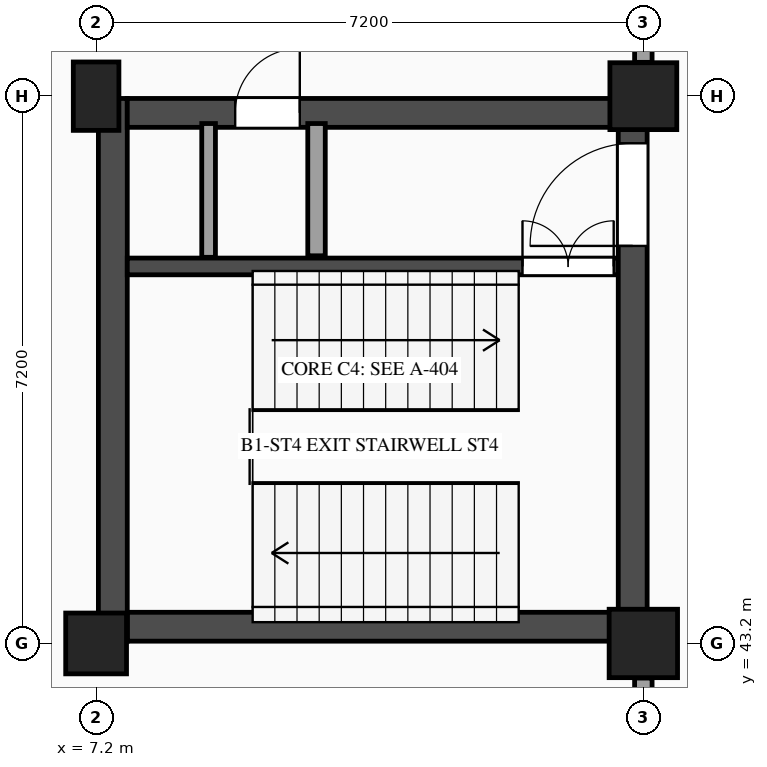
"""IFC4 building model, lengths in metres.
Left out: names, types, materials, properties, quantities, classifications, styles, units other than length and angle.
Written with IfcOpenShell. Run it as: python <this file> out.ifc"""

import sys

from ifc_helpers import new_model, si_unit, direction, frame, frame_2d, origin, origin_2d, place, context, subcontext, project, spatial, rectangle, extrude, element, fill, save


model = new_model("IFC4")
c1 = context("Model", 3, precision=1e-05, world=origin(), true_north=direction((0.0, 1.0)))
c2 = subcontext(c1, "Body", "Model", "MODEL_VIEW")
j1 = project(units=[si_unit("LENGTHUNIT", "METRE"), si_unit("PLANEANGLEUNIT", "RADIAN")], contexts=[c1])
p1 = place(None, origin())
s1 = spatial("IfcSite", under=j1, at=p1, CompositionType="ELEMENT")
p2 = place(p1, origin())
s2 = spatial("IfcBuilding", under=s1, at=p2, CompositionType="ELEMENT")
p3 = place(p2, frame((0.0, 0.0, -4.5)))
s3 = spatial("IfcBuildingStorey", under=s2, at=p3, CompositionType="ELEMENT", Elevation=-4.5)
p4 = place(p3, frame((7.2, 43.2, -0.45), z_axis=(0.0, 0.0, 1.0), x_axis=(1.0, 0.0, 0.0)))
e1 = element("IfcColumn", 1, at=p4, inside=s3, PredefinedType="COLUMN", context=c2, shape_type="SweptSolid", body=[
    extrude(rectangle(XDim=0.8, YDim=0.8, at=origin_2d()), origin(), (0.0, 0.0, 1.0), 4.95),
])
p5 = place(p3, frame((7.2, 50.4, -0.45), z_axis=(0.0, 0.0, 1.0), x_axis=(1.0, 0.0, 0.0)))
e2 = element("IfcColumn", 2, at=p5, inside=s3, PredefinedType="COLUMN", context=c2, shape_type="SweptSolid", body=[
    extrude(rectangle(XDim=0.6, YDim=0.9, at=origin_2d()), origin(), (0.0, 0.0, 1.0), 4.95),
])
p6 = place(p3, frame((14.4, 43.2, -0.45), z_axis=(0.0, 0.0, 1.0), x_axis=(1.0, 0.0, 0.0)))
e3 = element("IfcColumn", 3, at=p6, inside=s3, PredefinedType="COLUMN", context=c2, shape_type="SweptSolid", body=[
    extrude(rectangle(XDim=0.9, YDim=0.9, at=origin_2d()), origin(), (0.0, 0.0, 1.0), 4.95),
])
p7 = place(p3, frame((14.4, 50.4, -0.45), z_axis=(0.0, 0.0, 1.0), x_axis=(1.0, 0.0, 0.0)))
e4 = element("IfcColumn", 4, at=p7, inside=s3, PredefinedType="COLUMN", context=c2, shape_type="SweptSolid", body=[
    extrude(rectangle(XDim=0.88, YDim=0.88, at=origin_2d()), origin(), (0.0, 0.0, 1.0), 4.95),
])
p8 = place(p3, frame((7.61, 43.42, 0.0), z_axis=(0.0, 0.0, 1.0), x_axis=(1.0, 0.0, 0.0)))
e5 = element("IfcWall", 5, at=p8, inside=s3, PredefinedType="SHEAR", context=c2, shape_type="SweptSolid", body=[
    extrude(rectangle(XDim=6.46, YDim=0.38, at=frame_2d((3.23, 0.0))), origin(), (0.0, 0.0, 1.0), 4.17),
])
p9 = place(p3, frame((7.42, 50.37, 0.0), z_axis=(0.0, 0.0, 1.0), x_axis=(0.0, -1.0, 0.0)))
e6 = element("IfcWall", 6, at=p9, inside=s3, PredefinedType="SHEAR", context=c2, shape_type="SweptSolid", body=[
    extrude(rectangle(XDim=7.14, YDim=0.38, at=frame_2d((3.57, 0.0))), origin(), (0.0, 0.0, 1.0), 4.17),
])
p10 = place(p3, frame((7.61, 50.18, 0.0), z_axis=(0.0, 0.0, 1.0), x_axis=(1.0, 0.0, 0.0)))
e7 = element("IfcWall", 7, at=p10, inside=s3, PredefinedType="SHEAR", context=c2, shape_type="SweptSolid", body=[
    extrude(rectangle(XDim=6.46, YDim=0.38, at=frame_2d((3.23, 0.0))), origin(), (0.0, 0.0, 1.0), 4.17),
])
p11 = place(p10, frame((1.42, 0.0, 0.0)))
e8 = element("IfcOpeningElement", 8, at=p11, cuts=e7, PredefinedType="OPENING", context=c2, shape_type="SweptSolid", body=[
    extrude(rectangle(XDim=0.85, YDim=2.1, at=frame_2d((0.425, 1.05))), frame((0.0, 0.2, 0.0), z_axis=(0.0, -1.0, 0.0), x_axis=(1.0, 0.0, 0.0)), (0.0, 0.0, 1.0), 0.4),
])
p12 = place(p3, frame((7.61, 48.16, 0.0), z_axis=(0.0, 0.0, 1.0), x_axis=(1.0, 0.0, 0.0)))
e9 = element("IfcWall", 9, at=p12, inside=s3, PredefinedType="SHEAR", context=c2, shape_type="SweptSolid", body=[
    extrude(rectangle(XDim=6.46, YDim=0.22, at=frame_2d((3.23, 0.0))), origin(), (0.0, 0.0, 1.0), 4.17),
])
p13 = place(p12, frame((5.2, 0.0, 0.0)))
e10 = element("IfcOpeningElement", 10, at=p13, cuts=e9, PredefinedType="OPENING", context=c2, shape_type="SweptSolid", body=[
    extrude(rectangle(XDim=1.2, YDim=2.2, at=frame_2d((0.6, 1.1))), frame((0.0, 0.12, 0.0), z_axis=(0.0, -1.0, 0.0), x_axis=(1.0, 0.0, 0.0)), (0.0, 0.0, 1.0), 0.24),
])
p14 = place(p3, frame((10.1, 48.3, 0.0), z_axis=(0.0, 0.0, 1.0), x_axis=(0.0, 1.0, 0.0)))
e11 = element("IfcWall", 11, at=p14, inside=s3, PredefinedType="PARTITIONING", context=c2, shape_type="SweptSolid", body=[
    extrude(rectangle(XDim=1.74, YDim=0.23, at=frame_2d((0.87, 0.0))), origin(), (0.0, 0.0, 1.0), 4.17),
])
p15 = place(p3, frame((8.68, 48.28, 0.0), z_axis=(0.0, 0.0, 1.0), x_axis=(0.0, 1.0, 0.0)))
e12 = element("IfcWall", 12, at=p15, inside=s3, PredefinedType="PARTITIONING", context=c2, shape_type="SweptSolid", body=[
    extrude(rectangle(XDim=1.76, YDim=0.18, at=frame_2d((0.88, 0.0))), origin(), (0.0, 0.0, 1.0), 4.17),
])
p16 = place(p3, frame((14.26, 43.23, 0.0), z_axis=(0.0, 0.0, 1.0), x_axis=(0.0, 1.0, 0.0)))
e13 = element("IfcWall", 13, at=p16, inside=s3, PredefinedType="SHEAR", context=c2, shape_type="SweptSolid", body=[
    extrude(rectangle(XDim=7.14, YDim=0.38, at=frame_2d((3.57, 0.0))), origin(), (0.0, 0.0, 1.0), 4.17),
])
p17 = place(p16, frame((5.2, 0.0, 0.0)))
e14 = element("IfcOpeningElement", 14, at=p17, cuts=e13, PredefinedType="OPENING", context=c2, shape_type="SweptSolid", body=[
    extrude(rectangle(XDim=1.35, YDim=2.15, at=frame_2d((0.675, 1.075))), frame((0.0, 0.2, 0.0), z_axis=(0.0, -1.0, 0.0), x_axis=(1.0, 0.0, 0.0)), (0.0, 0.0, 1.0), 0.4),
])
p18 = place(p3, frame((14.4, 36.33, 0.0), z_axis=(0.0, 0.0, 1.0), x_axis=(0.0, 1.0, 0.0)))
e15 = element("IfcWall", 15, at=p18, inside=s3, PredefinedType="PARTITIONING", context=c2, shape_type="SweptSolid", body=[
    extrude(rectangle(XDim=6.415, YDim=0.23, at=frame_2d((3.208, 0.0))), origin(), (0.0, 0.0, 1.0), 3.475),
])
p19 = place(p18, frame((2.532, 0.0, 0.0)))
e16 = element("IfcOpeningElement", 16, at=p19, cuts=e15, PredefinedType="OPENING", context=c2, shape_type="SweptSolid", body=[
    extrude(rectangle(XDim=1.35, YDim=2.15, at=frame_2d((0.675, 1.075))), frame((0.0, 0.125, 0.0), z_axis=(0.0, -1.0, 0.0), x_axis=(1.0, 0.0, 0.0)), (0.0, 0.0, 1.0), 0.25),
])
p20 = place(p3, frame((14.4, 50.845, 0.0), z_axis=(0.0, 0.0, 1.0), x_axis=(0.0, 1.0, 0.0)))
e17 = element("IfcWall", 17, at=p20, inside=s3, PredefinedType="PARTITIONING", context=c2, shape_type="SweptSolid", body=[
    extrude(rectangle(XDim=6.34, YDim=0.23, at=frame_2d((3.17, 0.0))), origin(), (0.0, 0.0, 1.0), 3.54),
])
p21 = place(p11, origin())
e18 = element("IfcDoor", 18, at=p21, inside=s3, OperationType="SINGLE_SWING_RIGHT", PredefinedType="DOOR", context=c2, shape_type="SweptSolid", body=[
    extrude(rectangle(XDim=0.85, YDim=2.1, at=frame_2d((0.425, 1.05))), frame((0.0, 0.025, 0.0), z_axis=(0.0, -1.0, 0.0), x_axis=(1.0, 0.0, 0.0)), (0.0, 0.0, 1.0), 0.05),
])
fill(e8, e18)
p22 = place(p13, origin())
e19 = element("IfcDoor", 19, at=p22, inside=s3, OperationType="DOUBLE_DOOR_SINGLE_SWING", PredefinedType="DOOR", context=c2, shape_type="SweptSolid", body=[
    extrude(rectangle(XDim=1.2, YDim=2.2, at=frame_2d((0.6, 1.1))), frame((0.0, 0.025, 0.0), z_axis=(0.0, -1.0, 0.0), x_axis=(1.0, 0.0, 0.0)), (0.0, 0.0, 1.0), 0.05),
])
fill(e10, e19)
p23 = place(p17, origin())
e20 = element("IfcDoor", 20, at=p23, inside=s3, OperationType="SINGLE_SWING_LEFT", PredefinedType="DOOR", context=c2, shape_type="SweptSolid", body=[
    extrude(rectangle(XDim=1.35, YDim=2.15, at=frame_2d((0.675, 1.075))), frame((0.0, 0.025, 0.0), z_axis=(0.0, -1.0, 0.0), x_axis=(1.0, 0.0, 0.0)), (0.0, 0.0, 1.0), 0.05),
])
fill(e14, e20)
save(model, sys.argv[1])
